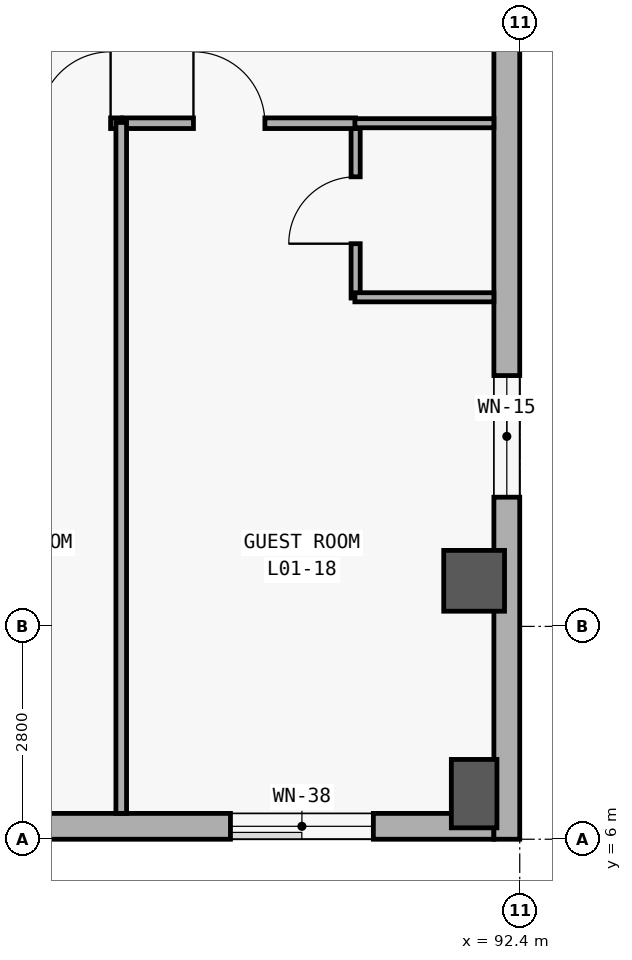
"""IFC4 building model, lengths in metres.
Left out: names, types, materials, properties, quantities, classifications, styles, units other than length and angle.
Written with IfcOpenShell. Run it as: python <this file> out.ifc"""

import sys

from ifc_helpers import new_model, si_unit, direction, frame, frame_2d, origin, origin_2d, place, context, subcontext, project, spatial, rectangle, extrude, element, fill, save


model = new_model("IFC4")
c1 = context("Model", 3, precision=1e-05, world=origin(), true_north=direction((0.0, 1.0)))
c2 = subcontext(c1, "Body", "Model", "MODEL_VIEW")
j1 = project(units=[si_unit("LENGTHUNIT", "METRE"), si_unit("PLANEANGLEUNIT", "RADIAN")], contexts=[c1])
p1 = place(None, origin())
s1 = spatial("IfcSite", under=j1, at=p1, CompositionType="ELEMENT")
p2 = place(p1, origin())
s2 = spatial("IfcBuilding", under=s1, at=p2, CompositionType="ELEMENT")
p3 = place(p2, frame((0.0, 0.0, 5.4)))
s3 = spatial("IfcBuildingStorey", under=s2, at=p3, CompositionType="ELEMENT", Elevation=5.4)
p4 = place(p3, frame((91.8, 6.6, 0.0), z_axis=(0.0, 0.0, 1.0), x_axis=(0.0, 1.0, 0.0)))
e1 = element("IfcColumn", 1, at=p4, inside=s3, PredefinedType="COLUMN", context=c2, shape_type="SweptSolid", body=[
    extrude(rectangle(XDim=0.6, YDim=0.9, at=origin_2d()), origin(), (0.0, 0.0, 1.0), 5.4),
])
p5 = place(p3, frame((91.8, 9.4, 0.0), z_axis=(0.0, 0.0, 1.0), x_axis=(1.0, 0.0, 0.0)))
e2 = element("IfcColumn", 2, at=p5, inside=s3, PredefinedType="COLUMN", context=c2, shape_type="SweptSolid", body=[
    extrude(rectangle(XDim=0.8, YDim=0.8, at=origin_2d()), origin(), (0.0, 0.0, 1.0), 5.4),
])
p6 = place(p3, frame((92.06, 6.17, 0.0), z_axis=(0.0, 0.0, 1.0), x_axis=(-1.0, 0.0, 0.0)))
e3 = element("IfcWall", 3, at=p6, inside=s3, PredefinedType="SOLIDWALL", context=c2, shape_type="SweptSolid", body=[
    extrude(rectangle(XDim=83.32, YDim=0.34, at=frame_2d((41.66, 0.0))), origin(), (0.0, 0.0, 1.0), 5.1),
])
p7 = place(p6, frame((80.804, 0.0, 0.85)))
e4 = element("IfcOpeningElement", 4, at=p7, cuts=e3, PredefinedType="OPENING", context=c2, shape_type="SweptSolid", body=[
    extrude(rectangle(XDim=1.8, YDim=1.8, at=frame_2d((0.9, 0.9))), frame((0.0, 0.18, 0.0), z_axis=(0.0, -1.0, 0.0), x_axis=(1.0, 0.0, 0.0)), (0.0, 0.0, 1.0), 0.36),
])
p8 = place(p6, frame((78.043, 0.0, 0.85)))
e5 = element("IfcOpeningElement", 5, at=p8, cuts=e3, PredefinedType="OPENING", context=c2, shape_type="SweptSolid", body=[
    extrude(rectangle(XDim=1.5, YDim=1.75, at=frame_2d((0.75, 0.875))), frame((0.0, 0.18, 0.0), z_axis=(0.0, -1.0, 0.0), x_axis=(1.0, 0.0, 0.0)), (0.0, 0.0, 1.0), 0.36),
])
p9 = place(p6, frame((75.057, 0.0, 0.85)))
e6 = element("IfcOpeningElement", 6, at=p9, cuts=e3, PredefinedType="OPENING", context=c2, shape_type="SweptSolid", body=[
    extrude(rectangle(XDim=1.65, YDim=1.75, at=frame_2d((0.825, 0.875))), frame((0.0, 0.18, 0.0), z_axis=(0.0, -1.0, 0.0), x_axis=(1.0, 0.0, 0.0)), (0.0, 0.0, 1.0), 0.36),
])
p10 = place(p6, frame((71.997, 0.0, 0.85)))
e7 = element("IfcOpeningElement", 7, at=p10, cuts=e3, PredefinedType="OPENING", context=c2, shape_type="SweptSolid", body=[
    extrude(rectangle(XDim=1.95, YDim=1.75, at=frame_2d((0.975, 0.875))), frame((0.0, 0.18, 0.0), z_axis=(0.0, -1.0, 0.0), x_axis=(1.0, 0.0, 0.0)), (0.0, 0.0, 1.0), 0.36),
])
p11 = place(p6, frame((69.36, 0.0, 0.85)))
e8 = element("IfcOpeningElement", 8, at=p11, cuts=e3, PredefinedType="OPENING", context=c2, shape_type="SweptSolid", body=[
    extrude(rectangle(XDim=1.4, YDim=1.6, at=frame_2d((0.7, 0.8))), frame((0.0, 0.18, 0.0), z_axis=(0.0, -1.0, 0.0), x_axis=(1.0, 0.0, 0.0)), (0.0, 0.0, 1.0), 0.36),
])
p12 = place(p6, frame((66.349, 0.0, 0.85)))
e9 = element("IfcOpeningElement", 9, at=p12, cuts=e3, PredefinedType="OPENING", context=c2, shape_type="SweptSolid", body=[
    extrude(rectangle(XDim=1.6, YDim=1.6, at=frame_2d((0.8, 0.8))), frame((0.0, 0.18, 0.0), z_axis=(0.0, -1.0, 0.0), x_axis=(1.0, 0.0, 0.0)), (0.0, 0.0, 1.0), 0.36),
])
p13 = place(p6, frame((63.338, 0.0, 0.85)))
e10 = element("IfcOpeningElement", 10, at=p13, cuts=e3, PredefinedType="OPENING", context=c2, shape_type="SweptSolid", body=[
    extrude(rectangle(XDim=1.8, YDim=1.6, at=frame_2d((0.9, 0.8))), frame((0.0, 0.18, 0.0), z_axis=(0.0, -1.0, 0.0), x_axis=(1.0, 0.0, 0.0)), (0.0, 0.0, 1.0), 0.36),
])
p14 = place(p6, frame((60.327, 0.0, 0.85)))
e11 = element("IfcOpeningElement", 11, at=p14, cuts=e3, PredefinedType="OPENING", context=c2, shape_type="SweptSolid", body=[
    extrude(rectangle(XDim=2.0, YDim=1.65, at=frame_2d((1.0, 0.825))), frame((0.0, 0.18, 0.0), z_axis=(0.0, -1.0, 0.0), x_axis=(1.0, 0.0, 0.0)), (0.0, 0.0, 1.0), 0.36),
])
p15 = place(p6, frame((57.791, 0.0, 0.85)))
e12 = element("IfcOpeningElement", 12, at=p15, cuts=e3, PredefinedType="OPENING", context=c2, shape_type="SweptSolid", body=[
    extrude(rectangle(XDim=1.25, YDim=1.45, at=frame_2d((0.625, 0.725))), frame((0.0, 0.18, 0.0), z_axis=(0.0, -1.0, 0.0), x_axis=(1.0, 0.0, 0.0)), (0.0, 0.0, 1.0), 0.36),
])
p16 = place(p6, frame((38.744, 0.0, 0.85)))
e13 = element("IfcOpeningElement", 13, at=p16, cuts=e3, PredefinedType="OPENING", context=c2, shape_type="SweptSolid", body=[
    extrude(rectangle(XDim=3.3, YDim=2.15, at=frame_2d((1.65, 1.075))), frame((0.0, 0.18, 0.0), z_axis=(0.0, -1.0, 0.0), x_axis=(1.0, 0.0, 0.0)), (0.0, 0.0, 1.0), 0.36),
])
p17 = place(p6, frame((35.07, 0.0, 0.85)))
e14 = element("IfcOpeningElement", 14, at=p17, cuts=e3, PredefinedType="OPENING", context=c2, shape_type="SweptSolid", body=[
    extrude(rectangle(XDim=1.18, YDim=1.5, at=frame_2d((0.59, 0.75))), frame((0.0, 0.18, 0.0), z_axis=(0.0, -1.0, 0.0), x_axis=(1.0, 0.0, 0.0)), (0.0, 0.0, 1.0), 0.36),
])
p18 = place(p6, frame((30.287, 0.0, 0.85)))
e15 = element("IfcOpeningElement", 15, at=p18, cuts=e3, PredefinedType="OPENING", context=c2, shape_type="SweptSolid", body=[
    extrude(rectangle(XDim=1.28, YDim=1.6, at=frame_2d((0.64, 0.8))), frame((0.0, 0.18, 0.0), z_axis=(0.0, -1.0, 0.0), x_axis=(1.0, 0.0, 0.0)), (0.0, 0.0, 1.0), 0.36),
])
p19 = place(p6, frame((25.503, 0.0, 0.85)))
e16 = element("IfcOpeningElement", 16, at=p19, cuts=e3, PredefinedType="OPENING", context=c2, shape_type="SweptSolid", body=[
    extrude(rectangle(XDim=1.38, YDim=1.7, at=frame_2d((0.69, 0.85))), frame((0.0, 0.18, 0.0), z_axis=(0.0, -1.0, 0.0), x_axis=(1.0, 0.0, 0.0)), (0.0, 0.0, 1.0), 0.36),
])
p20 = place(p6, frame((20.72, 0.0, 0.85)))
e17 = element("IfcOpeningElement", 17, at=p20, cuts=e3, PredefinedType="OPENING", context=c2, shape_type="SweptSolid", body=[
    extrude(rectangle(XDim=1.48, YDim=1.8, at=frame_2d((0.74, 0.9))), frame((0.0, 0.18, 0.0), z_axis=(0.0, -1.0, 0.0), x_axis=(1.0, 0.0, 0.0)), (0.0, 0.0, 1.0), 0.36),
])
p21 = place(p6, frame((15.937, 0.0, 0.85)))
e18 = element("IfcOpeningElement", 18, at=p21, cuts=e3, PredefinedType="OPENING", context=c2, shape_type="SweptSolid", body=[
    extrude(rectangle(XDim=1.58, YDim=1.85, at=frame_2d((0.79, 0.925))), frame((0.0, 0.18, 0.0), z_axis=(0.0, -1.0, 0.0), x_axis=(1.0, 0.0, 0.0)), (0.0, 0.0, 1.0), 0.36),
])
p22 = place(p6, frame((11.154, 0.0, 0.85)))
e19 = element("IfcOpeningElement", 19, at=p22, cuts=e3, PredefinedType="OPENING", context=c2, shape_type="SweptSolid", body=[
    extrude(rectangle(XDim=1.68, YDim=1.9, at=frame_2d((0.84, 0.95))), frame((0.0, 0.18, 0.0), z_axis=(0.0, -1.0, 0.0), x_axis=(1.0, 0.0, 0.0)), (0.0, 0.0, 1.0), 0.36),
])
p23 = place(p6, frame((6.37, 0.0, 0.85)))
e20 = element("IfcOpeningElement", 20, at=p23, cuts=e3, PredefinedType="OPENING", context=c2, shape_type="SweptSolid", body=[
    extrude(rectangle(XDim=1.78, YDim=1.95, at=frame_2d((0.89, 0.975))), frame((0.0, 0.18, 0.0), z_axis=(0.0, -1.0, 0.0), x_axis=(1.0, 0.0, 0.0)), (0.0, 0.0, 1.0), 0.36),
])
p24 = place(p6, frame((1.586, 0.0, 0.85)))
e21 = element("IfcOpeningElement", 21, at=p24, cuts=e3, PredefinedType="OPENING", context=c2, shape_type="SweptSolid", body=[
    extrude(rectangle(XDim=1.88, YDim=1.95, at=frame_2d((0.94, 0.975))), frame((0.0, 0.18, 0.0), z_axis=(0.0, -1.0, 0.0), x_axis=(1.0, 0.0, 0.0)), (0.0, 0.0, 1.0), 0.36),
])
p25 = place(p3, frame((92.23, 34.0, 0.0), z_axis=(0.0, 0.0, 1.0), x_axis=(0.0, -1.0, 0.0)))
e22 = element("IfcWall", 22, at=p25, inside=s3, PredefinedType="SOLIDWALL", context=c2, shape_type="SweptSolid", body=[
    extrude(rectangle(XDim=28.0, YDim=0.34, at=frame_2d((14.0, 0.0))), origin(), (0.0, 0.0, 1.0), 5.1),
])
p26 = place(p25, frame((21.9, 0.0, 0.95)))
e23 = element("IfcOpeningElement", 23, at=p26, cuts=e22, PredefinedType="OPENING", context=c2, shape_type="SweptSolid", body=[
    extrude(rectangle(XDim=1.6, YDim=1.6, at=frame_2d((0.8, 0.8))), frame((0.0, 0.18, 0.0), z_axis=(0.0, -1.0, 0.0), x_axis=(1.0, 0.0, 0.0)), (0.0, 0.0, 1.0), 0.36),
])
p27 = place(p3, frame((90.241, 13.12, 0.0), z_axis=(0.0, 0.0, 1.0), x_axis=(0.0, 1.0, 0.0)))
e24 = element("IfcWall", 24, at=p27, inside=s3, PredefinedType="PARTITIONING", context=c2, shape_type="SweptSolid", body=[
    extrude(rectangle(XDim=2.31, YDim=0.12, at=frame_2d((1.155, 0.0))), origin(), (0.0, 0.0, 1.0), 4.18),
])
p28 = place(p27, frame((0.715, 0.0, 0.0)))
e25 = element("IfcOpeningElement", 25, at=p28, cuts=e24, PredefinedType="OPENING", context=c2, shape_type="SweptSolid", body=[
    extrude(rectangle(XDim=0.88, YDim=2.15, at=frame_2d((0.44, 1.075))), frame((0.0, 0.07, 0.0), z_axis=(0.0, -1.0, 0.0), x_axis=(1.0, 0.0, 0.0)), (0.0, 0.0, 1.0), 0.14),
])
p29 = place(p3, frame((84.092, 15.42, 0.0), z_axis=(0.0, 0.0, 1.0), x_axis=(1.0, 0.0, 0.0)))
e26 = element("IfcWall", 26, at=p29, inside=s3, PredefinedType="PARTITIONING", context=c2, shape_type="SweptSolid", body=[
    extrude(rectangle(XDim=3.065, YDim=0.14, at=frame_2d((1.532, 0.0))), origin(), (0.0, 0.0, 1.0), 4.18),
])
p30 = place(p29, frame((1.985, 0.0, 0.0)))
e27 = element("IfcOpeningElement", 27, at=p30, cuts=e26, PredefinedType="OPENING", context=c2, shape_type="SweptSolid", body=[
    extrude(rectangle(XDim=0.94, YDim=2.2, at=frame_2d((0.47, 1.1))), frame((0.0, 0.08, 0.0), z_axis=(0.0, -1.0, 0.0), x_axis=(1.0, 0.0, 0.0)), (0.0, 0.0, 1.0), 0.16),
])
p31 = place(p3, frame((87.177, 15.42, 0.0), z_axis=(0.0, 0.0, 1.0), x_axis=(1.0, 0.0, 0.0)))
e28 = element("IfcWall", 28, at=p31, inside=s3, PredefinedType="PARTITIONING", context=c2, shape_type="SweptSolid", body=[
    extrude(rectangle(XDim=3.064, YDim=0.14, at=frame_2d((1.532, 0.0))), origin(), (0.0, 0.0, 1.0), 4.18),
])
p32 = place(p31, frame((0.93, 0.0, 0.0)))
e29 = element("IfcOpeningElement", 29, at=p32, cuts=e28, PredefinedType="OPENING", context=c2, shape_type="SweptSolid", body=[
    extrude(rectangle(XDim=0.94, YDim=2.2, at=frame_2d((0.47, 1.1))), frame((0.0, 0.08, 0.0), z_axis=(0.0, -1.0, 0.0), x_axis=(1.0, 0.0, 0.0)), (0.0, 0.0, 1.0), 0.16),
])
for number, where, z_axis, x_axis in (
    (30, (90.231, 13.13, 0.0), (0.0, 0.0, 1.0), (1.0, 0.0, 0.0)),
    (31, (90.231, 15.42, 0.0), (0.0, 0.0, 1.0), (1.0, 0.0, 0.0)),
):
    element("IfcWall", number, at=place(p3, frame(where, z_axis=z_axis, x_axis=x_axis)), inside=s3, PredefinedType="PARTITIONING", context=c2, shape_type="SweptSolid", body=[
        extrude(rectangle(XDim=1.829, YDim=0.12, at=frame_2d((0.915, 0.0))), origin(), (0.0, 0.0, 1.0), 4.18),
    ])
p33 = place(p3, frame((87.157, 6.34, 0.0), z_axis=(0.0, 0.0, 1.0), x_axis=(0.0, 1.0, 0.0)))
e32 = element("IfcWall", 32, at=p33, inside=s3, PredefinedType="PARTITIONING", context=c2, shape_type="SweptSolid", body=[
    extrude(rectangle(XDim=9.09, YDim=0.14, at=frame_2d((4.545, 0.0))), origin(), (0.0, 0.0, 1.0), 4.18),
])
p34 = place(p24, origin())
e33 = element("IfcWindow", 33, at=p34, inside=s3, PartitioningType="SINGLE_PANEL", PredefinedType="WINDOW", context=c2, shape_type="SweptSolid", body=[
    extrude(rectangle(XDim=1.88, YDim=1.95, at=frame_2d((0.94, 0.975))), frame((0.0, 0.03, 0.0), z_axis=(0.0, -1.0, 0.0), x_axis=(1.0, 0.0, 0.0)), (0.0, 0.0, 1.0), 0.06),
])
fill(e21, e33)
p35 = place(p26, origin())
e34 = element("IfcWindow", 34, at=p35, inside=s3, PartitioningType="SINGLE_PANEL", PredefinedType="WINDOW", context=c2, shape_type="SweptSolid", body=[
    extrude(rectangle(XDim=1.6, YDim=1.6, at=frame_2d((0.8, 0.8))), frame((0.0, 0.03, 0.0), z_axis=(0.0, -1.0, 0.0), x_axis=(1.0, 0.0, 0.0)), (0.0, 0.0, 1.0), 0.06),
])
fill(e23, e34)
p36 = place(p28, origin())
e35 = element("IfcDoor", 35, at=p36, inside=s3, OperationType="SINGLE_SWING_LEFT", PredefinedType="DOOR", context=c2, shape_type="SweptSolid", body=[
    extrude(rectangle(XDim=0.88, YDim=2.15, at=frame_2d((0.44, 1.075))), frame((0.0, 0.025, 0.0), z_axis=(0.0, -1.0, 0.0), x_axis=(1.0, 0.0, 0.0)), (0.0, 0.0, 1.0), 0.05),
])
fill(e25, e35)
p37 = place(p30, origin())
e36 = element("IfcDoor", 36, at=p37, inside=s3, OperationType="SINGLE_SWING_RIGHT", PredefinedType="DOOR", context=c2, shape_type="SweptSolid", body=[
    extrude(rectangle(XDim=0.94, YDim=2.2, at=frame_2d((0.47, 1.1))), frame((0.0, 0.025, 0.0), z_axis=(0.0, -1.0, 0.0), x_axis=(1.0, 0.0, 0.0)), (0.0, 0.0, 1.0), 0.05),
])
fill(e27, e36)
p38 = place(p32, origin())
e37 = element("IfcDoor", 37, at=p38, inside=s3, OperationType="SINGLE_SWING_LEFT", PredefinedType="DOOR", context=c2, shape_type="SweptSolid", body=[
    extrude(rectangle(XDim=0.94, YDim=2.2, at=frame_2d((0.47, 1.1))), frame((0.0, 0.025, 0.0), z_axis=(0.0, -1.0, 0.0), x_axis=(1.0, 0.0, 0.0)), (0.0, 0.0, 1.0), 0.05),
])
fill(e29, e37)
save(model, sys.argv[1])
